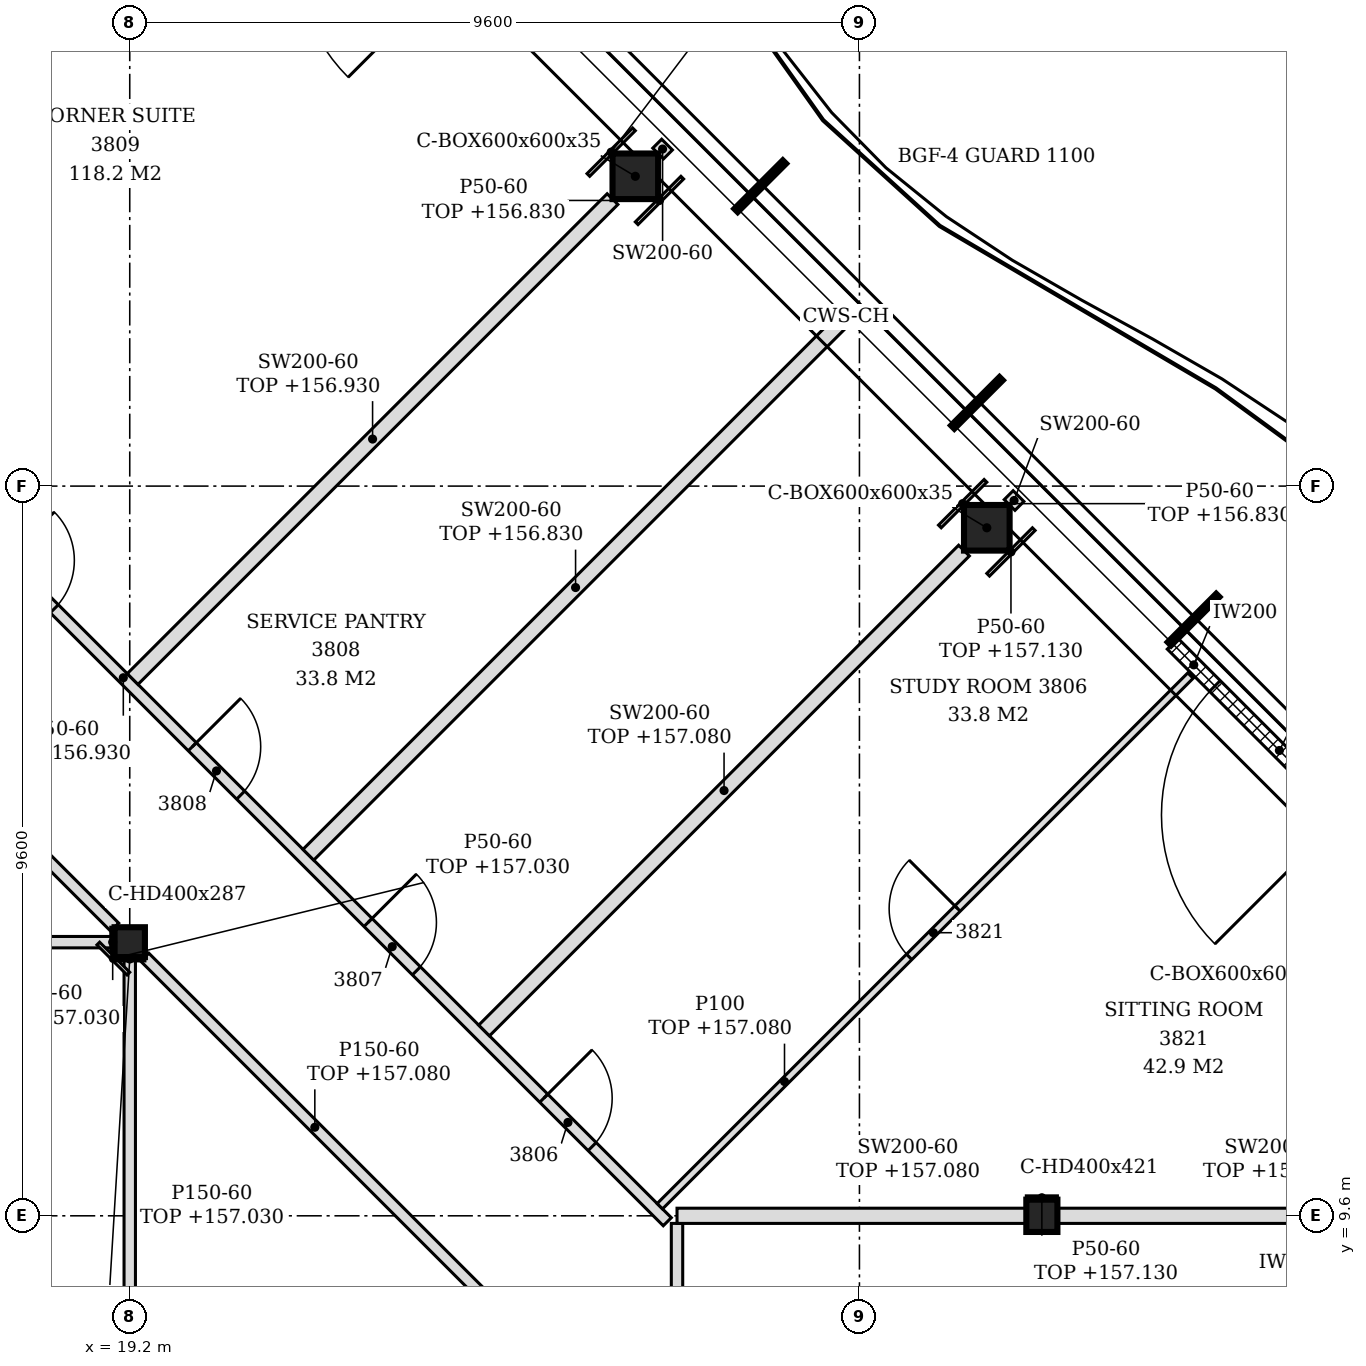
"""IFC4 building model, lengths in metres.
Left out: names, types, materials, properties, quantities, classifications, styles, units other than length and angle.
Written with IfcOpenShell. Run it as: python <this file> out.ifc"""

import sys

from ifc_helpers import new_model, si_unit, direction, frame, frame_2d, origin, origin_2d, place, context, subcontext, project, spatial, polyline, rectangle, hollow_rectangle, i_section, outline, extrude, element, fill, save


model = new_model("IFC4")
c1 = context("Model", 3, precision=1e-05, world=origin(), true_north=direction((0.0, 1.0)))
c2 = subcontext(c1, "Body", "Model", "MODEL_VIEW")
j1 = project(units=[si_unit("LENGTHUNIT", "METRE"), si_unit("PLANEANGLEUNIT", "RADIAN")], contexts=[c1])
p1 = place(None, origin())
s1 = spatial("IfcSite", under=j1, at=p1, CompositionType="ELEMENT")
p2 = place(p1, origin())
s2 = spatial("IfcBuilding", under=s1, at=p2, CompositionType="ELEMENT")
p3 = place(p2, frame((0.0, 0.0, 154.2)))
s3 = spatial("IfcBuildingStorey", under=s2, at=p3, CompositionType="ELEMENT", Elevation=154.2)
for number, where, z_axis, x_axis in (
    (1, (30.476, 18.652, -0.15), (0.0, 0.0, 1.0), (1.0, 0.0, 0.0)),
    (2, (25.852, 23.276, -0.15), (0.0, 0.0, 1.0), (1.0, 0.0, 0.0)),
):
    element("IfcColumn", number, at=place(p3, frame(where, z_axis=z_axis, x_axis=x_axis)), inside=s3, PredefinedType="COLUMN", context=c2, shape_type="SweptSolid", body=[
        extrude(hollow_rectangle(XDim=0.6, YDim=0.6, WallThickness=0.035, at=origin_2d()), origin(), (0.0, 0.0, 1.0), 3.6),
    ])
p4 = place(p3, frame((19.2, 13.2, -0.15), z_axis=(0.0, 0.0, 1.0), x_axis=(1.0, 0.0, 0.0)))
e3 = element("IfcColumn", 3, at=p4, inside=s3, PredefinedType="COLUMN", context=c2, shape_type="SweptSolid", body=[
    extrude(i_section(OverallWidth=0.399, OverallDepth=0.393, WebThickness=0.023, FlangeThickness=0.037, FilletRadius=0.015, at=origin_2d()), origin(), (0.0, 0.0, 1.0), 3.6),
])
p5 = place(p3, frame((31.2, 9.6, -0.15), z_axis=(0.0, 0.0, 1.0), x_axis=(1.0, 0.0, 0.0)))
e4 = element("IfcColumn", 4, at=p5, inside=s3, PredefinedType="COLUMN", context=c2, shape_type="SweptSolid", body=[
    extrude(i_section(OverallWidth=0.409, OverallDepth=0.425, WebThickness=0.033, FlangeThickness=0.052, FilletRadius=0.015, at=origin_2d()), origin(), (0.0, 0.0, 1.0), 3.6),
])
p6 = place(p3, frame((35.722, 14.325, 0.0), z_axis=(0.0, 0.0, 1.0), x_axis=(-0.707106781187, 0.707106781187, 0.0)))
e5 = element("IfcWall", 5, at=p6, inside=s3, PredefinedType="NOTDEFINED", context=c2, shape_type="SweptSolid", body=[
    extrude(rectangle(XDim=3.962, YDim=0.2, at=frame_2d((1.981, 0.0))), origin(), (0.0, 0.0, 1.0), 3.45),
])
p7 = place(p6, frame((0.775, 0.0, 0.0)))
e6 = element("IfcOpeningElement", 6, at=p7, cuts=e5, PredefinedType="OPENING", context=c2, shape_type="SweptSolid", body=[
    extrude(rectangle(XDim=2.4, YDim=2.4, at=frame_2d((1.2, 1.2))), frame((0.0, 0.11, 0.0), z_axis=(0.0, -1.0, 0.0), x_axis=(1.0, 0.0, 0.0)), (0.0, 0.0, 1.0), 0.22),
])
p8 = place(p3, frame((26.4, -4.448, 0.0), z_axis=(0.0, 0.0, 1.0), x_axis=(0.0, 1.0, 0.0)))
e7 = element("IfcWall", 7, at=p8, inside=s3, PredefinedType="PARTITIONING", context=c2, shape_type="SweptSolid", body=[
    extrude(outline(polyline([(0.0, 0.0), (13.948, 0.0), (13.948, 2.88), (13.943, 2.88), (13.941, 3.45), (9.353, 3.45), (9.351, 2.88), (9.143, 2.88), (9.141, 3.45), (4.553, 3.45), (4.551, 2.88), (4.343, 2.88), (4.341, 3.45), (0.0, 3.45), (0.0, 0.0)])), frame((0.0, 0.075, 0.0), z_axis=(0.0, -1.0, 0.0), x_axis=(1.0, 0.0, 0.0)), (0.0, 0.0, 1.0), 0.15),
])
p9 = place(p8, frame((1.701, 0.0, 0.0)))
e8 = element("IfcOpeningElement", 8, at=p9, cuts=e7, PredefinedType="OPENING", context=c2, shape_type="SweptSolid", body=[
    extrude(rectangle(XDim=0.9, YDim=2.1, at=frame_2d((0.45, 1.05))), frame((0.0, 0.085, 0.0), z_axis=(0.0, -1.0, 0.0), x_axis=(1.0, 0.0, 0.0)), (0.0, 0.0, 1.0), 0.17),
])
p10 = place(p8, frame((5.198, 0.0, 0.0)))
e9 = element("IfcOpeningElement", 9, at=p10, cuts=e7, PredefinedType="OPENING", context=c2, shape_type="SweptSolid", body=[
    extrude(rectangle(XDim=0.9, YDim=2.1, at=frame_2d((0.45, 1.05))), frame((0.0, 0.085, 0.0), z_axis=(0.0, -1.0, 0.0), x_axis=(1.0, 0.0, 0.0)), (0.0, 0.0, 1.0), 0.17),
])
p11 = place(p8, frame((11.095, 0.0, 0.0)))
e10 = element("IfcOpeningElement", 10, at=p11, cuts=e7, PredefinedType="OPENING", context=c2, shape_type="SweptSolid", body=[
    extrude(rectangle(XDim=0.9, YDim=2.1, at=frame_2d((0.45, 1.05))), frame((0.0, 0.085, 0.0), z_axis=(0.0, -1.0, 0.0), x_axis=(1.0, 0.0, 0.0)), (0.0, 0.0, 1.0), 0.17),
])
p12 = place(p3, frame((19.2, 2.596, 0.0), z_axis=(0.0, 0.0, 1.0), x_axis=(0.0, 1.0, 0.0)))
e11 = element("IfcWall", 11, at=p12, inside=s3, PredefinedType="PARTITIONING", context=c2, shape_type="SweptSolid", body=[
    extrude(rectangle(XDim=10.407, YDim=0.15, at=frame_2d((5.204, 0.0))), origin(), (0.0, 0.0, 1.0), 2.83),
])
p13 = place(p12, frame((2.954, 0.0, 0.0)))
e12 = element("IfcOpeningElement", 12, at=p13, cuts=e11, PredefinedType="OPENING", context=c2, shape_type="SweptSolid", body=[
    extrude(rectangle(XDim=0.9, YDim=2.1, at=frame_2d((0.45, 1.05))), frame((0.0, 0.085, 0.0), z_axis=(0.0, -1.0, 0.0), x_axis=(1.0, 0.0, 0.0)), (0.0, 0.0, 1.0), 0.17),
])
p14 = place(p3, frame((23.872, 8.528, 0.0), z_axis=(0.0, 0.0, 1.0), x_axis=(-0.707126073897, 0.70708748795, 0.0)))
e13 = element("IfcWall", 13, at=p14, inside=s3, PredefinedType="PARTITIONING", context=c2, shape_type="SweptSolid", body=[
    extrude(rectangle(XDim=6.327, YDim=0.15, at=frame_2d((3.164, 0.0))), origin(), (0.0, 0.0, 1.0), 2.88),
])
p15 = place(p3, frame((26.272, 9.522, 0.0), z_axis=(0.0, 0.0, 1.0), x_axis=(-0.707097742657, 0.707115819601, 0.0)))
e14 = element("IfcWall", 14, at=p15, inside=s3, PredefinedType="PARTITIONING", context=c2, shape_type="SweptSolid", body=[
    extrude(rectangle(XDim=13.506, YDim=0.15, at=frame_2d((6.753, 0.0))), origin(), (0.0, 0.0, 1.0), 2.73),
])
p16 = place(p15, frame((1.398, 0.0, 0.0)))
e15 = element("IfcOpeningElement", 15, at=p16, cuts=e14, PredefinedType="OPENING", context=c2, shape_type="SweptSolid", body=[
    extrude(rectangle(XDim=0.9, YDim=2.1, at=frame_2d((0.45, 1.05))), frame((0.0, 0.085, 0.0), z_axis=(0.0, -1.0, 0.0), x_axis=(1.0, 0.0, 0.0)), (0.0, 0.0, 1.0), 0.17),
])
p17 = place(p15, frame((4.668, 0.0, 0.0)))
e16 = element("IfcOpeningElement", 16, at=p17, cuts=e14, PredefinedType="OPENING", context=c2, shape_type="SweptSolid", body=[
    extrude(rectangle(XDim=0.9, YDim=2.1, at=frame_2d((0.45, 1.05))), frame((0.0, 0.085, 0.0), z_axis=(0.0, -1.0, 0.0), x_axis=(1.0, 0.0, 0.0)), (0.0, 0.0, 1.0), 0.17),
])
p18 = place(p15, frame((7.938, 0.0, 0.0)))
e17 = element("IfcOpeningElement", 17, at=p18, cuts=e14, PredefinedType="OPENING", context=c2, shape_type="SweptSolid", body=[
    extrude(rectangle(XDim=0.9, YDim=2.1, at=frame_2d((0.45, 1.05))), frame((0.0, 0.085, 0.0), z_axis=(0.0, -1.0, 0.0), x_axis=(1.0, 0.0, 0.0)), (0.0, 0.0, 1.0), 0.17),
])
p19 = place(p15, frame((11.405, 0.0, 0.0)))
e18 = element("IfcOpeningElement", 18, at=p19, cuts=e14, PredefinedType="OPENING", context=c2, shape_type="SweptSolid", body=[
    extrude(rectangle(XDim=0.9, YDim=2.1, at=frame_2d((0.45, 1.05))), frame((0.0, 0.085, 0.0), z_axis=(0.0, -1.0, 0.0), x_axis=(1.0, 0.0, 0.0)), (0.0, 0.0, 1.0), 0.17),
])
p20 = place(p3, frame((26.4, 9.6, 0.0), z_axis=(0.0, 0.0, 1.0), x_axis=(1.0, 0.0, 0.0)))
e19 = element("IfcWall", 19, at=p20, inside=s3, PredefinedType="PARTITIONING", context=c2, shape_type="SweptSolid", body=[
    extrude(rectangle(XDim=4.595, YDim=0.2, at=frame_2d((2.298, 0.0))), origin(), (0.0, 0.0, 1.0), 2.88),
])
p21 = place(p3, frame((31.405, 9.6, 0.0), z_axis=(0.0, 0.0, 1.0), x_axis=(1.0, 0.0, 0.0)))
e20 = element("IfcWall", 20, at=p21, inside=s3, PredefinedType="PARTITIONING", context=c2, shape_type="SweptSolid", body=[
    extrude(outline(polyline([(0.0, 0.0), (4.245, 0.0), (4.246, 3.07), (3.845, 3.07), (3.844, 2.93), (3.545, 2.93), (3.543, 3.07), (0.0, 3.07), (0.0, 0.0)])), frame((0.0, 0.1, 0.0), z_axis=(0.0, -1.0, 0.0), x_axis=(1.0, 0.0, 0.0)), (0.0, 0.0, 1.0), 0.2),
])
p22 = place(p3, frame((26.174, 9.726, 0.0), z_axis=(0.0, 0.0, 1.0), x_axis=(0.707106781187, 0.707106781187, 0.0)))
e21 = element("IfcWall", 21, at=p22, inside=s3, PredefinedType="PARTITIONING", context=c2, shape_type="SweptSolid", body=[
    extrude(rectangle(XDim=9.873, YDim=0.1, at=frame_2d((4.937, 0.0))), origin(), (0.0, 0.0, 1.0), 2.88),
])
p23 = place(p22, frame((4.639, 0.0, 0.0)))
e22 = element("IfcOpeningElement", 22, at=p23, cuts=e21, PredefinedType="OPENING", context=c2, shape_type="SweptSolid", body=[
    extrude(rectangle(XDim=0.9, YDim=2.1, at=frame_2d((0.45, 1.05))), frame((0.0, 0.06, 0.0), z_axis=(0.0, -1.0, 0.0), x_axis=(1.0, 0.0, 0.0)), (0.0, 0.0, 1.0), 0.12),
])
p24 = place(p3, frame((23.862, 12.038, 0.0), z_axis=(0.0, 0.0, 1.0), x_axis=(0.707106781187, 0.707106781187, 0.0)))
e23 = element("IfcWall", 23, at=p24, inside=s3, PredefinedType="PARTITIONING", context=c2, shape_type="SweptSolid", body=[
    extrude(rectangle(XDim=8.929, YDim=0.2, at=frame_2d((4.464, 0.0))), origin(), (0.0, 0.0, 1.0), 2.88),
])
p25 = place(p3, frame((7.399, 13.2, 0.0), z_axis=(0.0, 0.0, 1.0), x_axis=(1.0, 0.0, 0.0)))
e24 = element("IfcWall", 24, at=p25, inside=s3, PredefinedType="PARTITIONING", context=c2, shape_type="SweptSolid", body=[
    extrude(rectangle(XDim=11.601, YDim=0.15, at=frame_2d((5.801, 0.0))), origin(), (0.0, 0.0, 1.0), 2.83),
])
p26 = place(p25, frame((0.551, 0.0, 0.0)))
e25 = element("IfcOpeningElement", 25, at=p26, cuts=e24, PredefinedType="OPENING", context=c2, shape_type="SweptSolid", body=[
    extrude(rectangle(XDim=0.9, YDim=2.1, at=frame_2d((0.45, 1.05))), frame((0.0, 0.085, 0.0), z_axis=(0.0, -1.0, 0.0), x_axis=(1.0, 0.0, 0.0)), (0.0, 0.0, 1.0), 0.17),
])
p27 = place(p3, frame((19.002, 13.398, 0.0), z_axis=(0.0, 0.0, 1.0), x_axis=(-0.707106781187, 0.707106781187, 0.0)))
e26 = element("IfcWall", 26, at=p27, inside=s3, PredefinedType="PARTITIONING", context=c2, shape_type="SweptSolid", body=[
    extrude(rectangle(XDim=4.595, YDim=0.15, at=frame_2d((2.297, 0.0))), origin(), (0.0, 0.0, 1.0), 3.45),
])
p28 = place(p3, frame((21.55, 14.35, 0.0), z_axis=(0.0, 0.0, 1.0), x_axis=(0.707106781187, 0.707106781187, 0.0)))
e27 = element("IfcWall", 27, at=p28, inside=s3, PredefinedType="PARTITIONING", context=c2, shape_type="SweptSolid", body=[
    extrude(rectangle(XDim=9.943, YDim=0.2, at=frame_2d((4.972, 0.0))), origin(), (0.0, 0.0, 1.0), 2.63),
])
p29 = place(p3, frame((19.238, 16.662, 0.0), z_axis=(0.0, 0.0, 1.0), x_axis=(0.707106781187, 0.707106781187, 0.0)))
e28 = element("IfcWall", 28, at=p29, inside=s3, PredefinedType="PARTITIONING", context=c2, shape_type="SweptSolid", body=[
    extrude(rectangle(XDim=8.929, YDim=0.2, at=frame_2d((4.464, 0.0))), origin(), (0.0, 0.0, 1.0), 2.73),
])
for number, where, z_axis, x_axis in (
    (29, (30.776, 18.952, 0.0), (0.0, 0.0, 1.0), (0.707, 0.707, 0.0)),
    (30, (26.152, 23.576, 0.0), (0.0, 0.0, 1.0), (0.707, 0.707, 0.0)),
):
    element("IfcWall", number, at=place(p3, frame(where, z_axis=z_axis, x_axis=x_axis)), inside=s3, PredefinedType="PARTITIONING", context=c2, shape_type="SweptSolid", body=[
        extrude(rectangle(XDim=0.166, YDim=0.2, at=frame_2d((0.083, 0.0))), origin(), (0.0, 0.0, 1.0), 3.45),
    ])
p30 = place(p3, frame((18.976, 13.003, 0.0), z_axis=(0.0, 0.0, 1.0), x_axis=(0.0, 1.0, 0.0)))
e31 = element("IfcWall", 31, at=p30, inside=s3, PredefinedType="PARTITIONING", context=c2, shape_type="SweptSolid", body=[
    extrude(rectangle(XDim=0.393, YDim=0.05, at=frame_2d((0.197, 0.0))), origin(), (0.0, 0.0, 1.0), 2.83),
])
p31 = place(p3, frame((19.182, 12.786, 0.0), z_axis=(0.0, 0.0, 1.0), x_axis=(-0.707106781187, 0.707106781187, 0.0)))
e32 = element("IfcWall", 32, at=p31, inside=s3, PredefinedType="PARTITIONING", context=c2, shape_type="SweptSolid", body=[
    extrude(rectangle(XDim=0.56, YDim=0.05, at=frame_2d((0.28, 0.0))), origin(), (0.0, 0.0, 1.0), 2.83),
])
p32 = place(p3, frame((30.996, 9.837, 0.0), z_axis=(0.0, 0.0, 1.0), x_axis=(1.0, 0.0, 0.0)))
e33 = element("IfcWall", 33, at=p32, inside=s3, PredefinedType="PARTITIONING", context=c2, shape_type="SweptSolid", body=[
    extrude(rectangle(XDim=0.409, YDim=0.05, at=frame_2d((0.205, 0.0))), origin(), (0.0, 0.0, 1.0), 2.93),
])
p33 = place(p3, frame((29.858, 18.669, 0.0), z_axis=(0.0, 0.0, 1.0), x_axis=(0.707106781187, 0.707106781187, 0.0)))
e34 = element("IfcWall", 34, at=p33, inside=s3, PredefinedType="PARTITIONING", context=c2, shape_type="SweptSolid", body=[
    extrude(rectangle(XDim=0.849, YDim=0.05, at=frame_2d((0.424, 0.0))), origin(), (0.0, 0.0, 1.0), 2.63),
])
p34 = place(p3, frame((30.493, 18.034, 0.0), z_axis=(0.0, 0.0, 1.0), x_axis=(0.707106781187, 0.707106781187, 0.0)))
e35 = element("IfcWall", 35, at=p34, inside=s3, PredefinedType="PARTITIONING", context=c2, shape_type="SweptSolid", body=[
    extrude(rectangle(XDim=0.849, YDim=0.05, at=frame_2d((0.424, 0.0))), origin(), (0.0, 0.0, 1.0), 2.93),
])
p35 = place(p3, frame((19.0, 12.979, 0.0), z_axis=(0.0, 0.0, 1.0), x_axis=(1.0, 0.0, 0.0)))
e36 = element("IfcWall", 36, at=p35, inside=s3, PredefinedType="PARTITIONING", context=c2, shape_type="SweptSolid", body=[
    extrude(rectangle(XDim=0.399, YDim=0.05, at=frame_2d((0.199, 0.0))), origin(), (0.0, 0.0, 1.0), 2.83),
])
p36 = place(p3, frame((25.234, 23.293, 0.0), z_axis=(0.0, 0.0, 1.0), x_axis=(0.707106781187, 0.707106781187, 0.0)))
e37 = element("IfcWall", 37, at=p36, inside=s3, PredefinedType="PARTITIONING", context=c2, shape_type="SweptSolid", body=[
    extrude(rectangle(XDim=0.848, YDim=0.05, at=frame_2d((0.424, 0.0))), origin(), (0.0, 0.0, 1.0), 2.93),
])
p37 = place(p3, frame((25.869, 22.658, 0.0), z_axis=(0.0, 0.0, 1.0), x_axis=(0.707106781187, 0.707106781187, 0.0)))
e38 = element("IfcWall", 38, at=p37, inside=s3, PredefinedType="PARTITIONING", context=c2, shape_type="SweptSolid", body=[
    extrude(rectangle(XDim=0.849, YDim=0.05, at=frame_2d((0.424, 0.0))), origin(), (0.0, 0.0, 1.0), 2.63),
])
p38 = place(p7, origin())
e39 = element("IfcDoor", 39, at=p38, inside=s3, OperationType="SINGLE_SWING_LEFT", PredefinedType="DOOR", context=c2, shape_type="SweptSolid", body=[
    extrude(rectangle(XDim=2.4, YDim=2.4, at=frame_2d((1.2, 1.2))), frame((0.0, 0.025, 0.0), z_axis=(0.0, -1.0, 0.0), x_axis=(1.0, 0.0, 0.0)), (0.0, 0.0, 1.0), 0.05),
])
fill(e6, e39)
p39 = place(p16, frame((0.9, 0.0, 0.0), z_axis=(0.0, 0.0, 1.0), x_axis=(-1.0, 0.0, 0.0)))
e40 = element("IfcDoor", 40, at=p39, inside=s3, OperationType="SINGLE_SWING_LEFT", PredefinedType="DOOR", context=c2, shape_type="SweptSolid", body=[
    extrude(rectangle(XDim=0.9, YDim=2.1, at=frame_2d((0.45, 1.05))), frame((0.0, 0.025, 0.0), z_axis=(0.0, -1.0, 0.0), x_axis=(1.0, 0.0, 0.0)), (0.0, 0.0, 1.0), 0.05),
])
fill(e15, e40)
p40 = place(p17, frame((0.9, 0.0, 0.0), z_axis=(0.0, 0.0, 1.0), x_axis=(-1.0, 0.0, 0.0)))
e41 = element("IfcDoor", 41, at=p40, inside=s3, OperationType="SINGLE_SWING_LEFT", PredefinedType="DOOR", context=c2, shape_type="SweptSolid", body=[
    extrude(rectangle(XDim=0.9, YDim=2.1, at=frame_2d((0.45, 1.05))), frame((0.0, 0.025, 0.0), z_axis=(0.0, -1.0, 0.0), x_axis=(1.0, 0.0, 0.0)), (0.0, 0.0, 1.0), 0.05),
])
fill(e16, e41)
p41 = place(p18, frame((0.9, 0.0, 0.0), z_axis=(0.0, 0.0, 1.0), x_axis=(-1.0, 0.0, 0.0)))
e42 = element("IfcDoor", 42, at=p41, inside=s3, OperationType="SINGLE_SWING_LEFT", PredefinedType="DOOR", context=c2, shape_type="SweptSolid", body=[
    extrude(rectangle(XDim=0.9, YDim=2.1, at=frame_2d((0.45, 1.05))), frame((0.0, 0.025, 0.0), z_axis=(0.0, -1.0, 0.0), x_axis=(1.0, 0.0, 0.0)), (0.0, 0.0, 1.0), 0.05),
])
fill(e17, e42)
p42 = place(p19, frame((0.9, 0.0, 0.0), z_axis=(0.0, 0.0, 1.0), x_axis=(-1.0, 0.0, 0.0)))
e43 = element("IfcDoor", 43, at=p42, inside=s3, OperationType="SINGLE_SWING_LEFT", PredefinedType="DOOR", context=c2, shape_type="SweptSolid", body=[
    extrude(rectangle(XDim=0.9, YDim=2.1, at=frame_2d((0.45, 1.05))), frame((0.0, 0.025, 0.0), z_axis=(0.0, -1.0, 0.0), x_axis=(1.0, 0.0, 0.0)), (0.0, 0.0, 1.0), 0.05),
])
fill(e18, e43)
p43 = place(p23, origin())
e44 = element("IfcDoor", 44, at=p43, inside=s3, OperationType="SINGLE_SWING_RIGHT", PredefinedType="DOOR", context=c2, shape_type="SweptSolid", body=[
    extrude(rectangle(XDim=0.9, YDim=2.1, at=frame_2d((0.45, 1.05))), frame((0.0, 0.025, 0.0), z_axis=(0.0, -1.0, 0.0), x_axis=(1.0, 0.0, 0.0)), (0.0, 0.0, 1.0), 0.05),
])
fill(e22, e44)
save(model, sys.argv[1])
